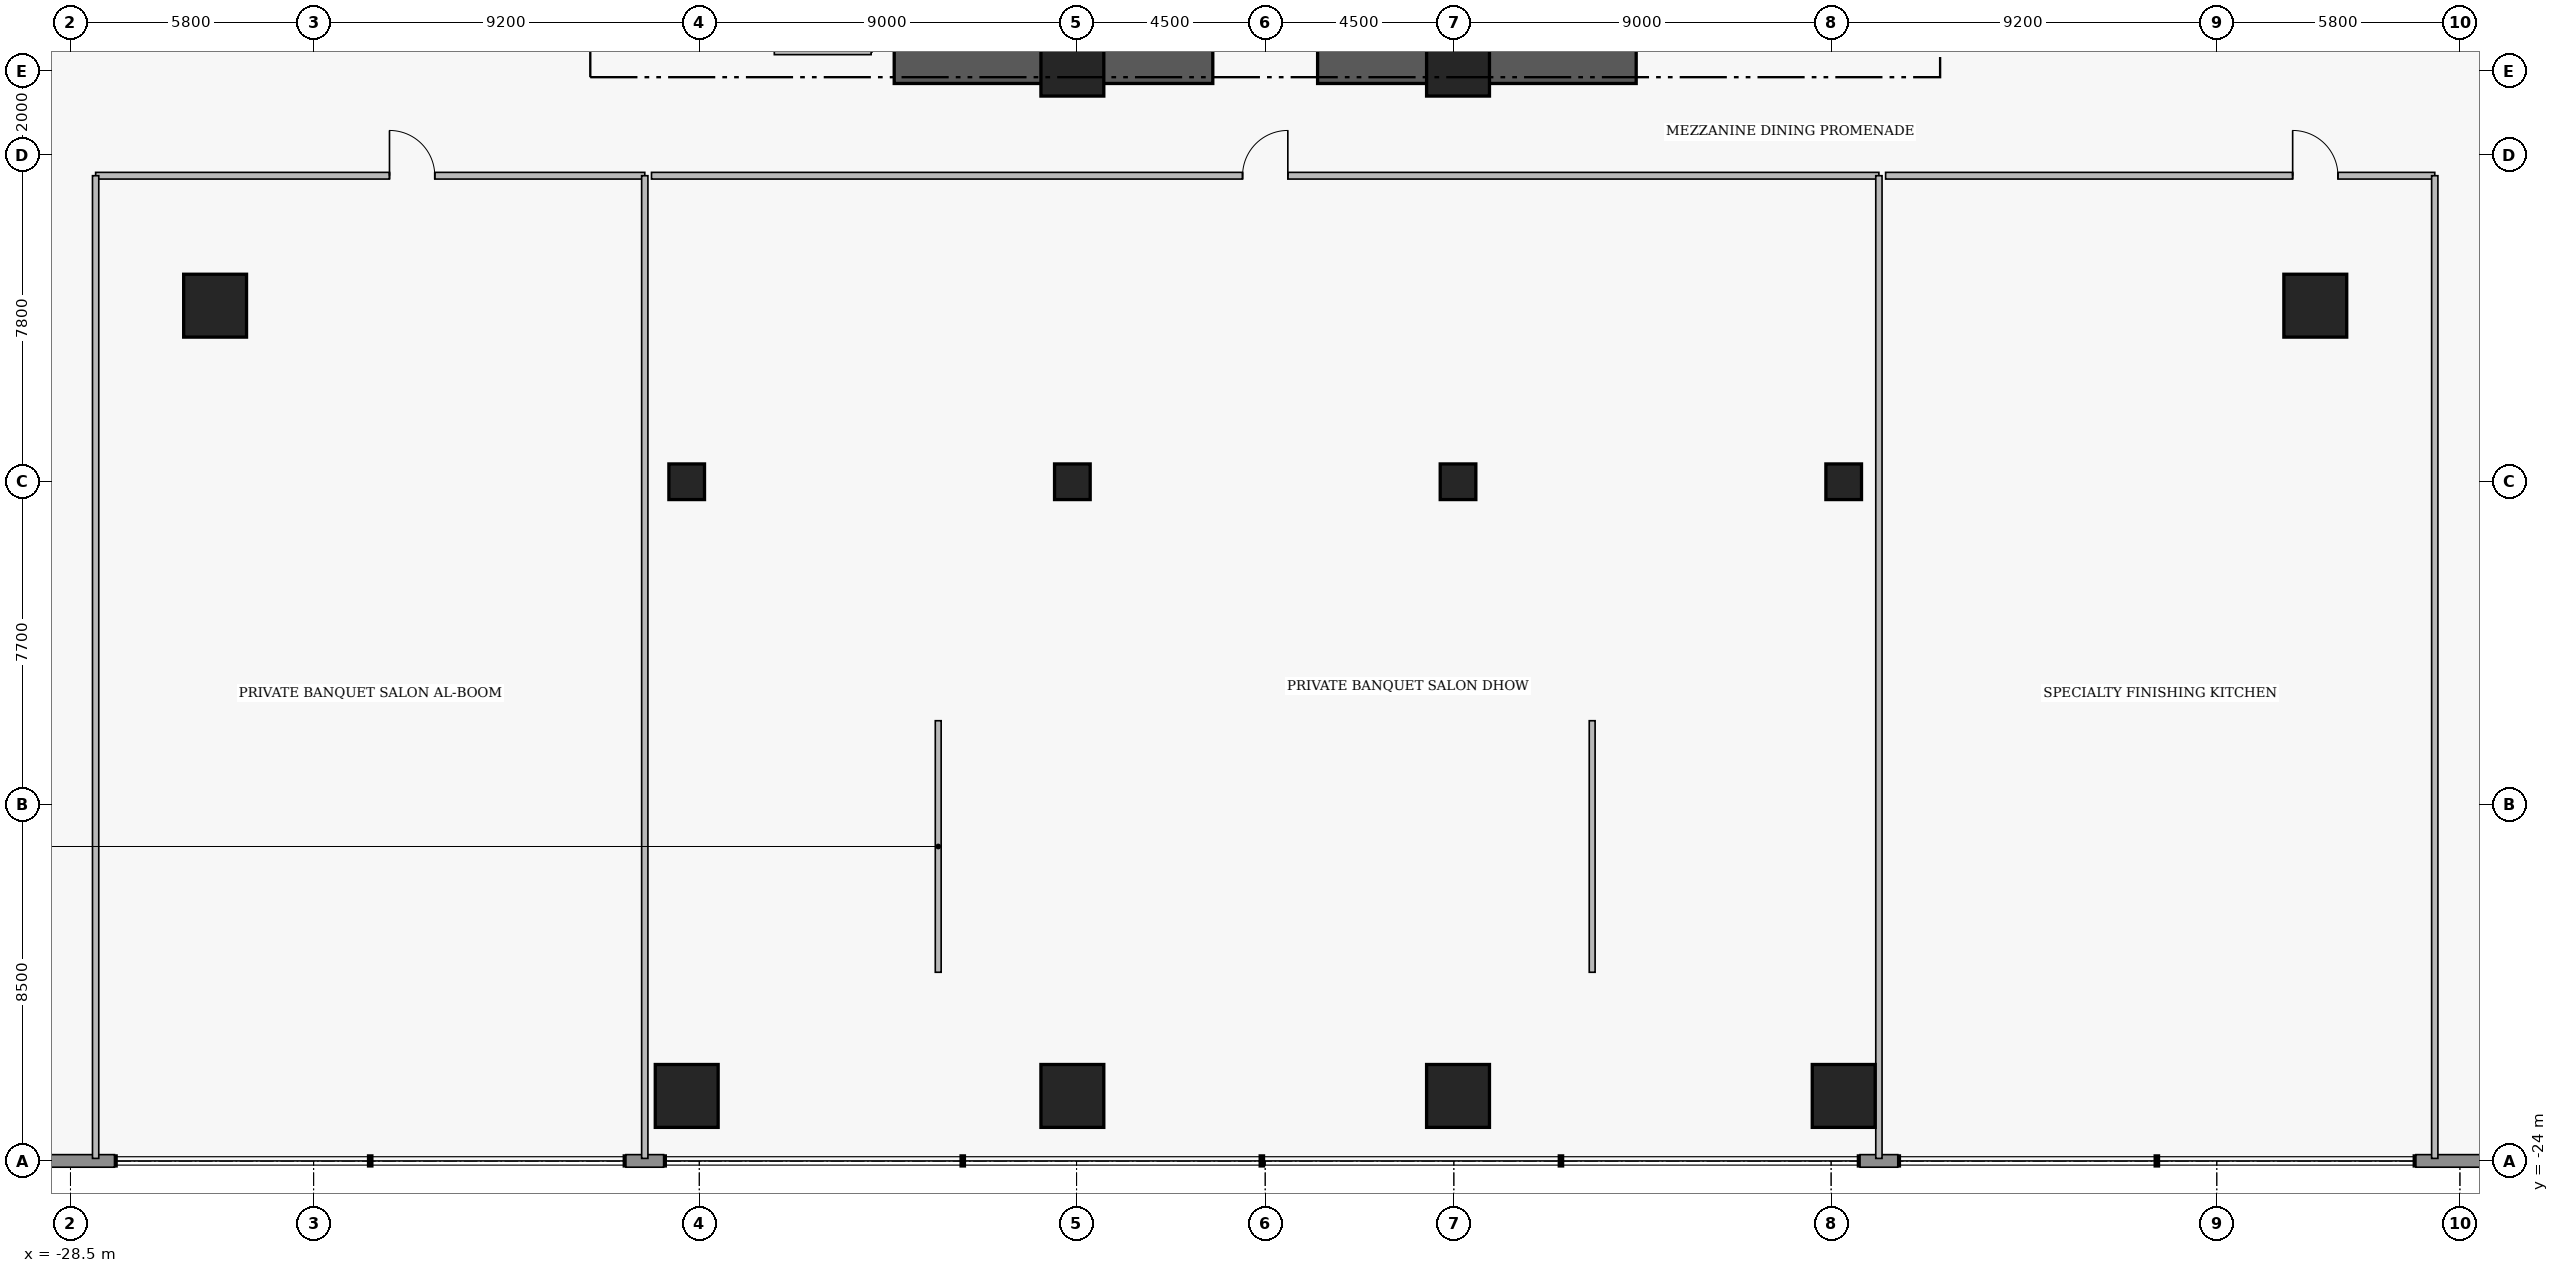
"""IFC4 building model, lengths in metres.
Left out: names, types, materials, properties, quantities, classifications, styles, units other than length and angle.
Written with IfcOpenShell. Run it as: python <this file> out.ifc"""

import sys

from ifc_helpers import new_model, si_unit, direction, frame, frame_2d, origin, origin_2d, place, context, subcontext, project, spatial, rectangle, extrude, element, fill, save


model = new_model("IFC4")
c1 = context("Model", 3, precision=1e-05, world=origin(), true_north=direction((0.0, 1.0)))
c2 = subcontext(c1, "Body", "Model", "MODEL_VIEW")
j1 = project(units=[si_unit("LENGTHUNIT", "METRE"), si_unit("PLANEANGLEUNIT", "RADIAN")], contexts=[c1])
p1 = place(None, origin())
s1 = spatial("IfcSite", under=j1, at=p1, CompositionType="ELEMENT")
p2 = place(p1, origin())
s2 = spatial("IfcBuilding", under=s1, at=p2, CompositionType="ELEMENT")
p3 = place(p2, frame((0.0, 0.0, 6.0)))
s3 = spatial("IfcBuildingStorey", under=s2, at=p3, CompositionType="ELEMENT", Elevation=6.0)
for number, where, z_axis, x_axis in (
    (1, (-8.85, 2.15, 0.0), (0.0, 0.0, 1.0), (1.0, 0.0, 0.0)),
    (2, (1.25, 2.15, 0.0), (0.0, 0.0, 1.0), (1.0, 0.0, 0.0)),
):
    element("IfcWall", number, at=place(p3, frame(where, z_axis=z_axis, x_axis=x_axis)), inside=s3, PredefinedType="SHEAR", context=c2, shape_type="SweptSolid", body=[
        extrude(rectangle(XDim=7.6, YDim=0.9, at=frame_2d((3.8, 0.0))), origin(), (0.0, 0.0, 1.0), 5.14),
    ])
for number, where, z_axis, x_axis in (
    (3, (-4.6, 2.15, 0.0), (0.0, 0.0, 1.0), (1.0, 0.0, 0.0)),
    (4, (4.6, 2.15, 0.0), (0.0, 0.0, 1.0), (1.0, 0.0, 0.0)),
    (5, (-13.8, -22.45, 0.0), (0.0, 0.0, 1.0), (1.0, 0.0, 0.0)),
    (6, (-4.6, -22.45, 0.0), (0.0, 0.0, 1.0), (1.0, 0.0, 0.0)),
    (7, (4.6, -22.45, 0.0), (0.0, 0.0, 1.0), (1.0, 0.0, 0.0)),
    (8, (13.8, -22.45, 0.0), (0.0, 0.0, 1.0), (1.0, 0.0, 0.0)),
    (9, (-25.05, -3.6, 0.0), (0.0, 0.0, 1.0), (1.0, 0.0, 0.0)),
    (10, (25.05, -3.6, 0.0), (0.0, 0.0, 1.0), (1.0, 0.0, 0.0)),
):
    element("IfcColumn", number, at=place(p3, frame(where, z_axis=z_axis, x_axis=x_axis)), inside=s3, PredefinedType="COLUMN", context=c2, shape_type="SweptSolid", body=[
        extrude(rectangle(XDim=1.5, YDim=1.5, at=origin_2d()), origin(), (0.0, 0.0, 1.0), 5.4),
    ])
for number, where, z_axis, x_axis in (
    (11, (-13.8, -7.8, 0.0), (0.0, 0.0, 1.0), (1.0, 0.0, 0.0)),
    (12, (-4.6, -7.8, 0.0), (0.0, 0.0, 1.0), (1.0, 0.0, 0.0)),
    (13, (4.6, -7.8, 0.0), (0.0, 0.0, 1.0), (1.0, 0.0, 0.0)),
    (14, (13.8, -7.8, 0.0), (0.0, 0.0, 1.0), (1.0, 0.0, 0.0)),
):
    element("IfcColumn", number, at=place(p3, frame(where, z_axis=z_axis, x_axis=x_axis)), inside=s3, PredefinedType="COLUMN", context=c2, shape_type="SweptSolid", body=[
        extrude(rectangle(XDim=0.85, YDim=0.85, at=origin_2d()), origin(), (0.0, 0.0, 1.0), 5.4),
    ])
p4 = place(p3, frame((32.0, -24.0, 0.0), z_axis=(0.0, 0.0, 1.0), x_axis=(-1.0, 0.0, 0.0)))
e15 = element("IfcWall", 15, at=p4, inside=s3, PredefinedType="STANDARD", context=c2, shape_type="SweptSolid", body=[
    extrude(rectangle(XDim=4.55, YDim=0.3, at=frame_2d((2.275, 0.0))), origin(), (0.0, 0.0, 1.0), 5.14),
])
p5 = place(p3, frame((15.09, -24.0, 0.0), z_axis=(0.0, 0.0, 1.0), x_axis=(-1.0, 0.0, 0.0)))
e16 = element("IfcWall", 16, at=p5, inside=s3, PredefinedType="STANDARD", context=c2, shape_type="SweptSolid", body=[
    extrude(rectangle(XDim=0.9, YDim=0.3, at=frame_2d((0.45, 0.0))), origin(), (0.0, 0.0, 1.0), 5.14),
])
p6 = place(p3, frame((-14.35, -24.0, 0.0), z_axis=(0.0, 0.0, 1.0), x_axis=(-1.0, 0.0, 0.0)))
e17 = element("IfcWall", 17, at=p6, inside=s3, PredefinedType="STANDARD", context=c2, shape_type="SweptSolid", body=[
    extrude(rectangle(XDim=0.9, YDim=0.3, at=frame_2d((0.45, 0.0))), origin(), (0.0, 0.0, 1.0), 5.14),
])
p7 = place(p3, frame((-27.45, -24.0, 0.0), z_axis=(0.0, 0.0, 1.0), x_axis=(-1.0, 0.0, 0.0)))
e18 = element("IfcWall", 18, at=p7, inside=s3, PredefinedType="STANDARD", context=c2, shape_type="SweptSolid", body=[
    extrude(rectangle(XDim=4.55, YDim=0.3, at=frame_2d((2.275, 0.0))), origin(), (0.0, 0.0, 1.0), 5.14),
])
p8 = place(p3, frame((-27.9, -0.5, 0.0), z_axis=(0.0, 0.0, 1.0), x_axis=(1.0, 0.0, 0.0)))
e19 = element("IfcWall", 19, at=p8, inside=s3, PredefinedType="PARTITIONING", context=c2, shape_type="SweptSolid", body=[
    extrude(rectangle(XDim=13.1, YDim=0.16, at=frame_2d((6.55, 0.0))), origin(), (0.0, 0.0, 1.0), 5.14),
])
p9 = place(p8, frame((7.01, 0.0, 0.0)))
e20 = element("IfcOpeningElement", 20, at=p9, cuts=e19, PredefinedType="OPENING", context=c2, shape_type="SweptSolid", body=[
    extrude(rectangle(XDim=1.08, YDim=2.18, at=frame_2d((0.54, 1.09))), frame((0.0, 0.09, 0.0), z_axis=(0.0, -1.0, 0.0), x_axis=(1.0, 0.0, 0.0)), (0.0, 0.0, 1.0), 0.18),
])
p10 = place(p3, frame((-14.64, -0.5, 0.0), z_axis=(0.0, 0.0, 1.0), x_axis=(1.0, 0.0, 0.0)))
e21 = element("IfcWall", 21, at=p10, inside=s3, PredefinedType="PARTITIONING", context=c2, shape_type="SweptSolid", body=[
    extrude(rectangle(XDim=29.28, YDim=0.16, at=frame_2d((14.64, 0.0))), origin(), (0.0, 0.0, 1.0), 5.14),
])
p11 = place(p10, frame((14.1, 0.0, 0.0)))
e22 = element("IfcOpeningElement", 22, at=p11, cuts=e21, PredefinedType="OPENING", context=c2, shape_type="SweptSolid", body=[
    extrude(rectangle(XDim=1.08, YDim=2.18, at=frame_2d((0.54, 1.09))), frame((0.0, 0.09, 0.0), z_axis=(0.0, -1.0, 0.0), x_axis=(1.0, 0.0, 0.0)), (0.0, 0.0, 1.0), 0.18),
])
p12 = place(p3, frame((14.8, -0.5, 0.0), z_axis=(0.0, 0.0, 1.0), x_axis=(1.0, 0.0, 0.0)))
e23 = element("IfcWall", 23, at=p12, inside=s3, PredefinedType="PARTITIONING", context=c2, shape_type="SweptSolid", body=[
    extrude(rectangle(XDim=13.1, YDim=0.16, at=frame_2d((6.55, 0.0))), origin(), (0.0, 0.0, 1.0), 5.14),
])
p13 = place(p12, frame((9.71, 0.0, 0.0)))
e24 = element("IfcOpeningElement", 24, at=p13, cuts=e23, PredefinedType="OPENING", context=c2, shape_type="SweptSolid", body=[
    extrude(rectangle(XDim=1.08, YDim=2.18, at=frame_2d((0.54, 1.09))), frame((0.0, 0.09, 0.0), z_axis=(0.0, -1.0, 0.0), x_axis=(1.0, 0.0, 0.0)), (0.0, 0.0, 1.0), 0.18),
])
p14 = place(p3, frame((-11.71, 2.47, 0.0), z_axis=(0.0, 0.0, 1.0), x_axis=(1.0, 0.0, 0.0)))
e25 = element("IfcWall", 25, at=p14, inside=s3, PredefinedType="PARTITIONING", context=c2, shape_type="SweptSolid", body=[
    extrude(rectangle(XDim=2.31, YDim=0.165, at=frame_2d((1.155, 0.0))), origin(), (0.0, 0.0, 1.0), 3.74),
])
for number, where, z_axis, x_axis in (
    (26, (-27.9, -23.94, 0.0), (0.0, 0.0, 1.0), (0.0, 1.0, 0.0)),
    (27, (-14.8, -23.94, 0.0), (0.0, 0.0, 1.0), (0.0, 1.0, 0.0)),
    (28, (14.64, -23.94, 0.0), (0.0, 0.0, 1.0), (0.0, 1.0, 0.0)),
    (29, (27.9, -23.94, 0.0), (0.0, 0.0, 1.0), (0.0, 1.0, 0.0)),
):
    element("IfcWall", number, at=place(p3, frame(where, z_axis=z_axis, x_axis=x_axis)), inside=s3, PredefinedType="PARTITIONING", context=c2, shape_type="SweptSolid", body=[
        extrude(rectangle(XDim=23.44, YDim=0.15, at=frame_2d((11.72, 0.0))), origin(), (0.0, 0.0, 1.0), 5.14),
    ])
for number, where, z_axis, x_axis in (
    (30, (-7.8, -19.5, 0.0), (0.0, 0.0, 1.0), (0.0, 1.0, 0.0)),
    (31, (7.8, -19.5, 0.0), (0.0, 0.0, 1.0), (0.0, 1.0, 0.0)),
):
    element("IfcWall", number, at=place(p3, frame(where, z_axis=z_axis, x_axis=x_axis)), inside=s3, PredefinedType="MOVABLE", context=c2, shape_type="SweptSolid", body=[
        extrude(rectangle(XDim=6.0, YDim=0.14, at=frame_2d((3.0, 0.0))), origin(), (0.0, 0.0, 1.0), 5.14),
    ])
p15 = place(p9, origin())
e32 = element("IfcDoor", 32, at=p15, inside=s3, OperationType="SINGLE_SWING_LEFT", PredefinedType="DOOR", context=c2, shape_type="SweptSolid", body=[
    extrude(rectangle(XDim=1.08, YDim=2.18, at=frame_2d((0.54, 1.09))), frame((0.0, 0.025, 0.0), z_axis=(0.0, -1.0, 0.0), x_axis=(1.0, 0.0, 0.0)), (0.0, 0.0, 1.0), 0.05),
])
fill(e20, e32)
p16 = place(p11, origin())
e33 = element("IfcDoor", 33, at=p16, inside=s3, OperationType="SINGLE_SWING_RIGHT", PredefinedType="DOOR", context=c2, shape_type="SweptSolid", body=[
    extrude(rectangle(XDim=1.08, YDim=2.18, at=frame_2d((0.54, 1.09))), frame((0.0, 0.025, 0.0), z_axis=(0.0, -1.0, 0.0), x_axis=(1.0, 0.0, 0.0)), (0.0, 0.0, 1.0), 0.05),
])
fill(e22, e33)
p17 = place(p13, origin())
e34 = element("IfcDoor", 34, at=p17, inside=s3, OperationType="SINGLE_SWING_LEFT", PredefinedType="DOOR", context=c2, shape_type="SweptSolid", body=[
    extrude(rectangle(XDim=1.08, YDim=2.18, at=frame_2d((0.54, 1.09))), frame((0.0, 0.025, 0.0), z_axis=(0.0, -1.0, 0.0), x_axis=(1.0, 0.0, 0.0)), (0.0, 0.0, 1.0), 0.05),
])
fill(e24, e34)
save(model, sys.argv[1])
